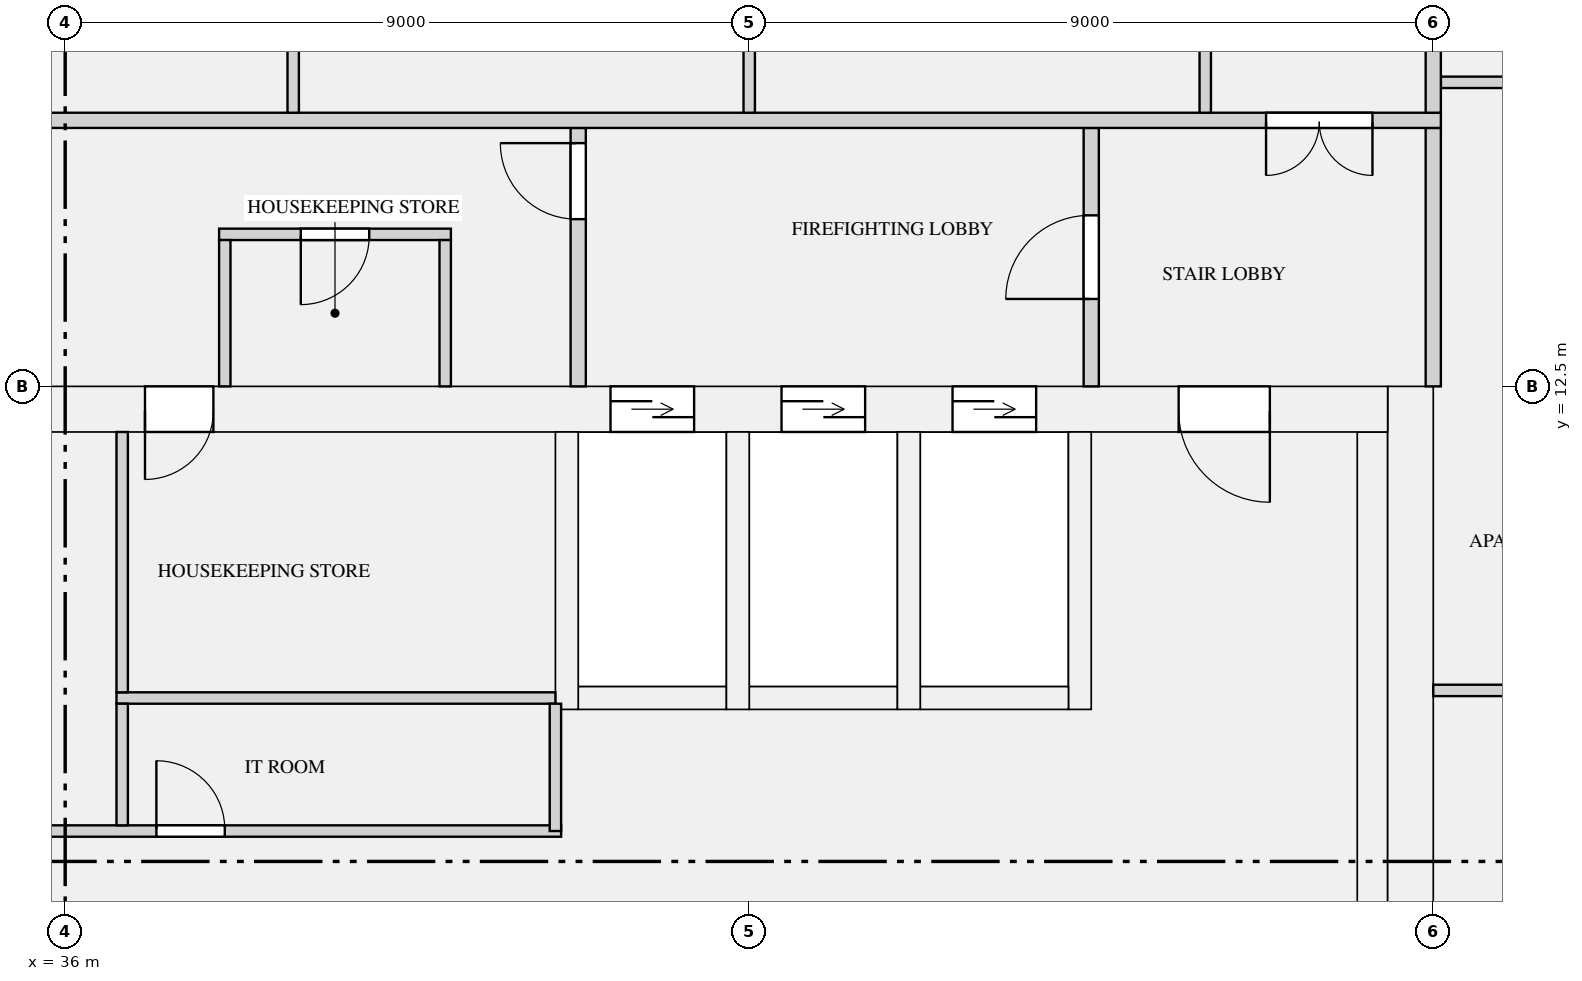
"""IFC4 building model, lengths in metres.
Left out: names, types, materials, properties, quantities, classifications, styles, units other than length and angle.
Written with IfcOpenShell. Run it as: python <this file> out.ifc"""

import sys

from ifc_helpers import new_model, si_unit, direction, frame, frame_2d, origin, place, context, subcontext, project, spatial, rectangle, extrude, element, fill, save


model = new_model("IFC4")
c1 = context("Model", 3, precision=1e-05, world=origin(), true_north=direction((0.0, 1.0)))
c2 = subcontext(c1, "Body", "Model", "MODEL_VIEW")
j1 = project(units=[si_unit("LENGTHUNIT", "METRE"), si_unit("PLANEANGLEUNIT", "RADIAN")], contexts=[c1])
p1 = place(None, origin())
s1 = spatial("IfcSite", under=j1, at=p1, CompositionType="ELEMENT")
p2 = place(p1, origin())
s2 = spatial("IfcBuilding", under=s1, at=p2, CompositionType="ELEMENT")
p3 = place(p2, frame((0.0, 0.0, 198.0)))
s3 = spatial("IfcBuildingStorey", under=s2, at=p3, CompositionType="ELEMENT", Elevation=198.0)
p4 = place(p3, frame((53.7, 0.0, 0.0), z_axis=(0.0, 0.0, 1.0), x_axis=(0.0, 1.0, 0.0)))
e1 = element("IfcWall", 1, at=p4, inside=s3, PredefinedType="SHEAR", context=c2, shape_type="SweptSolid", body=[
    extrude(rectangle(XDim=12.5, YDim=0.6, at=frame_2d((6.25, 0.0))), origin(), (0.0, 0.0, 1.0), 3.15),
])
p5 = place(p3, frame((18.6, 12.2, 0.0), z_axis=(0.0, 0.0, 1.0), x_axis=(1.0, 0.0, 0.0)))
e2 = element("IfcWall", 2, at=p5, inside=s3, PredefinedType="SHEAR", context=c2, shape_type="SweptSolid", body=[
    extrude(rectangle(XDim=34.8, YDim=0.6, at=frame_2d((17.4, 0.0))), origin(), (0.0, 0.0, 1.0), 3.15),
])
p6 = place(p5, frame((24.575, 0.0, 0.0)))
e3 = element("IfcOpeningElement", 3, at=p6, cuts=e2, PredefinedType="OPENING", context=c2, shape_type="SweptSolid", body=[
    extrude(rectangle(XDim=1.1, YDim=2.1, at=frame_2d((0.55, 1.05))), frame((0.0, 0.31, 0.0), z_axis=(0.0, -1.0, 0.0), x_axis=(1.0, 0.0, 0.0)), (0.0, 0.0, 1.0), 0.62),
])
p7 = place(p5, frame((26.825, 0.0, 0.0)))
e4 = element("IfcOpeningElement", 4, at=p7, cuts=e2, PredefinedType="OPENING", context=c2, shape_type="SweptSolid", body=[
    extrude(rectangle(XDim=1.1, YDim=2.1, at=frame_2d((0.55, 1.05))), frame((0.0, 0.31, 0.0), z_axis=(0.0, -1.0, 0.0), x_axis=(1.0, 0.0, 0.0)), (0.0, 0.0, 1.0), 0.62),
])
p8 = place(p5, frame((29.075, 0.0, 0.0)))
e5 = element("IfcOpeningElement", 5, at=p8, cuts=e2, PredefinedType="OPENING", context=c2, shape_type="SweptSolid", body=[
    extrude(rectangle(XDim=1.1, YDim=2.1, at=frame_2d((0.55, 1.05))), frame((0.0, 0.31, 0.0), z_axis=(0.0, -1.0, 0.0), x_axis=(1.0, 0.0, 0.0)), (0.0, 0.0, 1.0), 0.62),
])
p9 = place(p5, frame((4.95, 0.0, 0.0)))
e6 = element("IfcOpeningElement", 6, at=p9, cuts=e2, PredefinedType="OPENING", context=c2, shape_type="SweptSolid", body=[
    extrude(rectangle(XDim=0.9, YDim=2.1, at=frame_2d((0.45, 1.05))), frame((0.0, 0.31, 0.0), z_axis=(0.0, -1.0, 0.0), x_axis=(1.0, 0.0, 0.0)), (0.0, 0.0, 1.0), 0.62),
])
p10 = place(p5, frame((18.45, 0.0, 0.0)))
e7 = element("IfcOpeningElement", 7, at=p10, cuts=e2, PredefinedType="OPENING", context=c2, shape_type="SweptSolid", body=[
    extrude(rectangle(XDim=0.9, YDim=2.1, at=frame_2d((0.45, 1.05))), frame((0.0, 0.31, 0.0), z_axis=(0.0, -1.0, 0.0), x_axis=(1.0, 0.0, 0.0)), (0.0, 0.0, 1.0), 0.62),
])
p11 = place(p5, frame((1.55, 0.0, 0.0)))
e8 = element("IfcOpeningElement", 8, at=p11, cuts=e2, PredefinedType="OPENING", context=c2, shape_type="SweptSolid", body=[
    extrude(rectangle(XDim=1.2, YDim=2.1, at=frame_2d((0.6, 1.05))), frame((0.0, 0.31, 0.0), z_axis=(0.0, -1.0, 0.0), x_axis=(1.0, 0.0, 0.0)), (0.0, 0.0, 1.0), 0.62),
])
p12 = place(p5, frame((32.05, 0.0, 0.0)))
e9 = element("IfcOpeningElement", 9, at=p12, cuts=e2, PredefinedType="OPENING", context=c2, shape_type="SweptSolid", body=[
    extrude(rectangle(XDim=1.2, YDim=2.1, at=frame_2d((0.6, 1.05))), frame((0.0, 0.31, 0.0), z_axis=(0.0, -1.0, 0.0), x_axis=(1.0, 0.0, 0.0)), (0.0, 0.0, 1.0), 0.62),
])
p13 = place(p3, frame((53.2, 1.0, 0.0), z_axis=(0.0, 0.0, 1.0), x_axis=(0.0, 1.0, 0.0)))
e10 = element("IfcWall", 10, at=p13, inside=s3, PredefinedType="SHEAR", context=c2, shape_type="SweptSolid", body=[
    extrude(rectangle(XDim=10.9, YDim=0.4, at=frame_2d((5.45, 0.0))), origin(), (0.0, 0.0, 1.0), 3.15),
])
p14 = place(p3, frame((42.75, 8.4, 0.0), z_axis=(0.0, 0.0, 1.0), x_axis=(1.0, 0.0, 0.0)))
e11 = element("IfcWall", 11, at=p14, inside=s3, PredefinedType="SHEAR", context=c2, shape_type="SweptSolid", body=[
    extrude(rectangle(XDim=1.95, YDim=0.3, at=frame_2d((0.975, 0.0))), origin(), (0.0, 0.0, 1.0), 3.15),
])
p15 = place(p3, frame((42.6, 8.25, 0.0), z_axis=(0.0, 0.0, 1.0), x_axis=(0.0, 1.0, 0.0)))
e12 = element("IfcWall", 12, at=p15, inside=s3, PredefinedType="SHEAR", context=c2, shape_type="SweptSolid", body=[
    extrude(rectangle(XDim=3.65, YDim=0.3, at=frame_2d((1.825, 0.0))), origin(), (0.0, 0.0, 1.0), 3.15),
])
p16 = place(p3, frame((45.0, 8.4, 0.0), z_axis=(0.0, 0.0, 1.0), x_axis=(1.0, 0.0, 0.0)))
e13 = element("IfcWall", 13, at=p16, inside=s3, PredefinedType="SHEAR", context=c2, shape_type="SweptSolid", body=[
    extrude(rectangle(XDim=1.95, YDim=0.3, at=frame_2d((0.975, 0.0))), origin(), (0.0, 0.0, 1.0), 3.15),
])
p17 = place(p3, frame((44.85, 8.25, 0.0), z_axis=(0.0, 0.0, 1.0), x_axis=(0.0, 1.0, 0.0)))
e14 = element("IfcWall", 14, at=p17, inside=s3, PredefinedType="SHEAR", context=c2, shape_type="SweptSolid", body=[
    extrude(rectangle(XDim=3.65, YDim=0.3, at=frame_2d((1.825, 0.0))), origin(), (0.0, 0.0, 1.0), 3.15),
])
p18 = place(p3, frame((47.25, 8.4, 0.0), z_axis=(0.0, 0.0, 1.0), x_axis=(1.0, 0.0, 0.0)))
e15 = element("IfcWall", 15, at=p18, inside=s3, PredefinedType="SHEAR", context=c2, shape_type="SweptSolid", body=[
    extrude(rectangle(XDim=1.95, YDim=0.3, at=frame_2d((0.975, 0.0))), origin(), (0.0, 0.0, 1.0), 3.15),
])
for number, where, z_axis, x_axis in (
    (16, (47.1, 8.25, 0.0), (0.0, 0.0, 1.0), (0.0, 1.0, 0.0)),
    (17, (49.35, 8.25, 0.0), (0.0, 0.0, 1.0), (0.0, 1.0, 0.0)),
):
    element("IfcWall", number, at=place(p3, frame(where, z_axis=z_axis, x_axis=x_axis)), inside=s3, PredefinedType="SHEAR", context=c2, shape_type="SweptSolid", body=[
        extrude(rectangle(XDim=3.65, YDim=0.3, at=frame_2d((1.825, 0.0))), origin(), (0.0, 0.0, 1.0), 3.15),
    ])
p19 = place(p3, frame((22.725, 6.65, 0.0), z_axis=(0.0, 0.0, 1.0), x_axis=(1.0, 0.0, 0.0)))
e18 = element("IfcWall", 18, at=p19, inside=s3, PredefinedType="PARTITIONING", context=c2, shape_type="SweptSolid", body=[
    extrude(rectangle(XDim=19.8, YDim=0.15, at=frame_2d((9.9, 0.0))), origin(), (0.0, 0.0, 1.0), 2.83),
])
p20 = place(p19, frame((0.825, 0.0, 0.0)))
e19 = element("IfcOpeningElement", 19, at=p20, cuts=e18, PredefinedType="OPENING", context=c2, shape_type="SweptSolid", body=[
    extrude(rectangle(XDim=0.9, YDim=2.1, at=frame_2d((0.45, 1.05))), frame((0.0, 0.085, 0.0), z_axis=(0.0, -1.0, 0.0), x_axis=(1.0, 0.0, 0.0)), (0.0, 0.0, 1.0), 0.17),
])
p21 = place(p19, frame((4.825, 0.0, 0.0)))
e20 = element("IfcOpeningElement", 20, at=p21, cuts=e18, PredefinedType="OPENING", context=c2, shape_type="SweptSolid", body=[
    extrude(rectangle(XDim=0.9, YDim=2.1, at=frame_2d((0.45, 1.05))), frame((0.0, 0.085, 0.0), z_axis=(0.0, -1.0, 0.0), x_axis=(1.0, 0.0, 0.0)), (0.0, 0.0, 1.0), 0.17),
])
p22 = place(p19, frame((9.825, 0.0, 0.0)))
e21 = element("IfcOpeningElement", 21, at=p22, cuts=e18, PredefinedType="OPENING", context=c2, shape_type="SweptSolid", body=[
    extrude(rectangle(XDim=0.9, YDim=2.1, at=frame_2d((0.45, 1.05))), frame((0.0, 0.085, 0.0), z_axis=(0.0, -1.0, 0.0), x_axis=(1.0, 0.0, 0.0)), (0.0, 0.0, 1.0), 0.17),
])
p23 = place(p19, frame((14.475, 0.0, 0.0)))
e22 = element("IfcOpeningElement", 22, at=p23, cuts=e18, PredefinedType="OPENING", context=c2, shape_type="SweptSolid", body=[
    extrude(rectangle(XDim=0.9, YDim=2.1, at=frame_2d((0.45, 1.05))), frame((0.0, 0.085, 0.0), z_axis=(0.0, -1.0, 0.0), x_axis=(1.0, 0.0, 0.0)), (0.0, 0.0, 1.0), 0.17),
])
p24 = place(p3, frame((36.675, 8.4, 0.0), z_axis=(0.0, 0.0, 1.0), x_axis=(1.0, 0.0, 0.0)))
e23 = element("IfcWall", 23, at=p24, inside=s3, PredefinedType="PARTITIONING", context=c2, shape_type="SweptSolid", body=[
    extrude(rectangle(XDim=5.775, YDim=0.15, at=frame_2d((2.887, 0.0))), origin(), (0.0, 0.0, 1.0), 2.83),
])
p25 = place(p3, frame((38.025, 14.5, 0.0), z_axis=(0.0, 0.0, 1.0), x_axis=(1.0, 0.0, 0.0)))
e24 = element("IfcWall", 24, at=p25, inside=s3, PredefinedType="PARTITIONING", context=c2, shape_type="SweptSolid", body=[
    extrude(rectangle(XDim=3.05, YDim=0.15, at=frame_2d((1.525, 0.0))), origin(), (0.0, 0.0, 1.0), 2.83),
])
p26 = place(p25, frame((1.075, 0.0, 0.0)))
e25 = element("IfcOpeningElement", 25, at=p26, cuts=e24, PredefinedType="OPENING", context=c2, shape_type="SweptSolid", body=[
    extrude(rectangle(XDim=0.9, YDim=2.1, at=frame_2d((0.45, 1.05))), frame((0.0, 0.085, 0.0), z_axis=(0.0, -1.0, 0.0), x_axis=(1.0, 0.0, 0.0)), (0.0, 0.0, 1.0), 0.17),
])
p27 = place(p3, frame((42.45, 6.65, 0.0), z_axis=(0.0, 0.0, 1.0), x_axis=(0.0, 1.0, 0.0)))
e26 = element("IfcWall", 26, at=p27, inside=s3, PredefinedType="PARTITIONING", context=c2, shape_type="SweptSolid", body=[
    extrude(rectangle(XDim=1.675, YDim=0.15, at=frame_2d((0.837, 0.0))), origin(), (0.0, 0.0, 1.0), 2.83),
])
p28 = place(p3, frame((36.75, 6.725, 0.0), z_axis=(0.0, 0.0, 1.0), x_axis=(0.0, 1.0, 0.0)))
e27 = element("IfcWall", 27, at=p28, inside=s3, PredefinedType="PARTITIONING", context=c2, shape_type="SweptSolid", body=[
    extrude(rectangle(XDim=1.6, YDim=0.15, at=frame_2d((0.8, 0.0))), origin(), (0.0, 0.0, 1.0), 2.83),
])
p29 = place(p3, frame((36.75, 8.475, 0.0), z_axis=(0.0, 0.0, 1.0), x_axis=(0.0, 1.0, 0.0)))
e28 = element("IfcWall", 28, at=p29, inside=s3, PredefinedType="PARTITIONING", context=c2, shape_type="SweptSolid", body=[
    extrude(rectangle(XDim=3.425, YDim=0.15, at=frame_2d((1.712, 0.0))), origin(), (0.0, 0.0, 1.0), 2.83),
])
for number, where, z_axis, x_axis in (
    (29, (38.1, 12.5, 0.0), (0.0, 0.0, 1.0), (0.0, 1.0, 0.0)),
    (30, (41.0, 12.5, 0.0), (0.0, 0.0, 1.0), (0.0, 1.0, 0.0)),
):
    element("IfcWall", number, at=place(p3, frame(where, z_axis=z_axis, x_axis=x_axis)), inside=s3, PredefinedType="PARTITIONING", context=c2, shape_type="SweptSolid", body=[
        extrude(rectangle(XDim=1.925, YDim=0.15, at=frame_2d((0.962, 0.0))), origin(), (0.0, 0.0, 1.0), 2.83),
    ])
p30 = place(p3, frame((42.75, 12.5, 0.0), z_axis=(0.0, 0.0, 1.0), x_axis=(0.0, 1.0, 0.0)))
e31 = element("IfcWall", 31, at=p30, inside=s3, PredefinedType="PARTITIONING", context=c2, shape_type="SweptSolid", body=[
    extrude(rectangle(XDim=3.4, YDim=0.2, at=frame_2d((1.7, 0.0))), origin(), (0.0, 0.0, 1.0), 2.83),
])
p31 = place(p30, frame((2.2, 0.0, 0.0)))
e32 = element("IfcOpeningElement", 32, at=p31, cuts=e31, PredefinedType="OPENING", context=c2, shape_type="SweptSolid", body=[
    extrude(rectangle(XDim=1.0, YDim=2.1, at=frame_2d((0.5, 1.05))), frame((0.0, 0.11, 0.0), z_axis=(0.0, -1.0, 0.0), x_axis=(1.0, 0.0, 0.0)), (0.0, 0.0, 1.0), 0.22),
])
p32 = place(p3, frame((49.5, 12.5, 0.0), z_axis=(0.0, 0.0, 1.0), x_axis=(0.0, 1.0, 0.0)))
e33 = element("IfcWall", 33, at=p32, inside=s3, PredefinedType="PARTITIONING", context=c2, shape_type="SweptSolid", body=[
    extrude(rectangle(XDim=3.4, YDim=0.2, at=frame_2d((1.7, 0.0))), origin(), (0.0, 0.0, 1.0), 2.83),
])
p33 = place(p32, frame((1.15, 0.0, 0.0)))
e34 = element("IfcOpeningElement", 34, at=p33, cuts=e33, PredefinedType="OPENING", context=c2, shape_type="SweptSolid", body=[
    extrude(rectangle(XDim=1.1, YDim=2.1, at=frame_2d((0.55, 1.05))), frame((0.0, 0.11, 0.0), z_axis=(0.0, -1.0, 0.0), x_axis=(1.0, 0.0, 0.0)), (0.0, 0.0, 1.0), 0.22),
])
p34 = place(p3, frame((54.0, 12.5, 0.0), z_axis=(0.0, 0.0, 1.0), x_axis=(0.0, 1.0, 0.0)))
e35 = element("IfcWall", 35, at=p34, inside=s3, PredefinedType="PARTITIONING", context=c2, shape_type="SweptSolid", body=[
    extrude(rectangle(XDim=3.4, YDim=0.2, at=frame_2d((1.7, 0.0))), origin(), (0.0, 0.0, 1.0), 2.83),
])
p35 = place(p3, frame((54.1, 16.5, 0.0), z_axis=(0.0, 0.0, 1.0), x_axis=(1.0, 0.0, 0.0)))
e36 = element("IfcWall", 36, at=p35, inside=s3, PredefinedType="PARTITIONING", context=c2, shape_type="SweptSolid", body=[
    extrude(rectangle(XDim=14.75, YDim=0.15, at=frame_2d((7.375, 0.0))), origin(), (0.0, 0.0, 1.0), 2.83),
])
p36 = place(p35, frame((1.4, 0.0, 0.0)))
e37 = element("IfcOpeningElement", 37, at=p36, cuts=e36, PredefinedType="OPENING", context=c2, shape_type="SweptSolid", body=[
    extrude(rectangle(XDim=1.5, YDim=2.1, at=frame_2d((0.75, 1.05))), frame((0.0, 0.085, 0.0), z_axis=(0.0, -1.0, 0.0), x_axis=(1.0, 0.0, 0.0)), (0.0, 0.0, 1.0), 0.17),
])
p37 = place(p35, frame((11.15, 0.0, 0.0)))
e38 = element("IfcOpeningElement", 38, at=p37, cuts=e36, PredefinedType="OPENING", context=c2, shape_type="SweptSolid", body=[
    extrude(rectangle(XDim=1.5, YDim=2.1, at=frame_2d((0.75, 1.05))), frame((0.0, 0.085, 0.0), z_axis=(0.0, -1.0, 0.0), x_axis=(1.0, 0.0, 0.0)), (0.0, 0.0, 1.0), 0.17),
])
p38 = place(p3, frame((54.0, 8.5, 0.0), z_axis=(0.0, 0.0, 1.0), x_axis=(1.0, 0.0, 0.0)))
e39 = element("IfcWall", 39, at=p38, inside=s3, PredefinedType="PARTITIONING", context=c2, shape_type="SweptSolid", body=[
    extrude(rectangle(XDim=8.925, YDim=0.15, at=frame_2d((4.462, 0.0))), origin(), (0.0, 0.0, 1.0), 2.83),
])
p39 = place(p38, frame((1.8, 0.0, 0.0)))
e40 = element("IfcOpeningElement", 40, at=p39, cuts=e39, PredefinedType="OPENING", context=c2, shape_type="SweptSolid", body=[
    extrude(rectangle(XDim=0.9, YDim=2.1, at=frame_2d((0.45, 1.05))), frame((0.0, 0.085, 0.0), z_axis=(0.0, -1.0, 0.0), x_axis=(1.0, 0.0, 0.0)), (0.0, 0.0, 1.0), 0.17),
])
p40 = place(p38, frame((6.3, 0.0, 0.0)))
e41 = element("IfcOpeningElement", 41, at=p40, cuts=e39, PredefinedType="OPENING", context=c2, shape_type="SweptSolid", body=[
    extrude(rectangle(XDim=0.9, YDim=2.1, at=frame_2d((0.45, 1.05))), frame((0.0, 0.085, 0.0), z_axis=(0.0, -1.0, 0.0), x_axis=(1.0, 0.0, 0.0)), (0.0, 0.0, 1.0), 0.17),
])
p41 = place(p3, frame((17.9, 16.0, 0.0), z_axis=(0.0, 0.0, 1.0), x_axis=(1.0, 0.0, 0.0)))
e42 = element("IfcWall", 42, at=p41, inside=s3, PredefinedType="PARTITIONING", context=c2, shape_type="SweptSolid", body=[
    extrude(rectangle(XDim=36.2, YDim=0.2, at=frame_2d((18.1, 0.0))), origin(), (0.0, 0.0, 1.0), 2.83),
])
p42 = place(p41, frame((0.9, 0.0, 0.0)))
e43 = element("IfcOpeningElement", 43, at=p42, cuts=e42, PredefinedType="OPENING", context=c2, shape_type="SweptSolid", body=[
    extrude(rectangle(XDim=1.4, YDim=2.1, at=frame_2d((0.7, 1.05))), frame((0.0, 0.11, 0.0), z_axis=(0.0, -1.0, 0.0), x_axis=(1.0, 0.0, 0.0)), (0.0, 0.0, 1.0), 0.22),
])
p43 = place(p41, frame((33.9, 0.0, 0.0)))
e44 = element("IfcOpeningElement", 44, at=p43, cuts=e42, PredefinedType="OPENING", context=c2, shape_type="SweptSolid", body=[
    extrude(rectangle(XDim=1.4, YDim=2.1, at=frame_2d((0.7, 1.05))), frame((0.0, 0.11, 0.0), z_axis=(0.0, -1.0, 0.0), x_axis=(1.0, 0.0, 0.0)), (0.0, 0.0, 1.0), 0.22),
])
p44 = place(p3, frame((54.0, 16.1, 0.0), z_axis=(0.0, 0.0, 1.0), x_axis=(0.0, 1.0, 0.0)))
e45 = element("IfcWall", 45, at=p44, inside=s3, PredefinedType="PARTITIONING", context=c2, shape_type="SweptSolid", body=[
    extrude(rectangle(XDim=7.8, YDim=0.2, at=frame_2d((3.9, 0.0))), origin(), (0.0, 0.0, 1.0), 2.83),
])
p45 = place(p44, frame((1.85, 0.0, 0.0)))
e46 = element("IfcOpeningElement", 46, at=p45, cuts=e45, PredefinedType="OPENING", context=c2, shape_type="SweptSolid", body=[
    extrude(rectangle(XDim=1.1, YDim=2.1, at=frame_2d((0.55, 1.05))), frame((0.0, 0.11, 0.0), z_axis=(0.0, -1.0, 0.0), x_axis=(1.0, 0.0, 0.0)), (0.0, 0.0, 1.0), 0.22),
])
for number, where, z_axis, x_axis in (
    (47, (51.0, 16.1, 0.0), (0.0, 0.0, 1.0), (0.0, 1.0, 0.0)),
    (48, (45.0, 16.1, 0.0), (0.0, 0.0, 1.0), (0.0, 1.0, 0.0)),
    (49, (39.0, 16.1, 0.0), (0.0, 0.0, 1.0), (0.0, 1.0, 0.0)),
):
    element("IfcWall", number, at=place(p3, frame(where, z_axis=z_axis, x_axis=x_axis)), inside=s3, PredefinedType="PARTITIONING", context=c2, shape_type="SweptSolid", body=[
        extrude(rectangle(XDim=4.825, YDim=0.15, at=frame_2d((2.413, 0.0))), origin(), (0.0, 0.0, 1.0), 2.83),
    ])
p46 = place(p6, origin())
e50 = element("IfcDoor", 50, at=p46, inside=s3, OperationType="DOUBLE_DOOR_SLIDING", PredefinedType="DOOR", context=c2, shape_type="SweptSolid", body=[
    extrude(rectangle(XDim=1.1, YDim=2.1, at=frame_2d((0.55, 1.05))), frame((0.0, 0.025, 0.0), z_axis=(0.0, -1.0, 0.0), x_axis=(1.0, 0.0, 0.0)), (0.0, 0.0, 1.0), 0.05),
])
fill(e3, e50)
p47 = place(p7, origin())
e51 = element("IfcDoor", 51, at=p47, inside=s3, OperationType="DOUBLE_DOOR_SLIDING", PredefinedType="DOOR", context=c2, shape_type="SweptSolid", body=[
    extrude(rectangle(XDim=1.1, YDim=2.1, at=frame_2d((0.55, 1.05))), frame((0.0, 0.025, 0.0), z_axis=(0.0, -1.0, 0.0), x_axis=(1.0, 0.0, 0.0)), (0.0, 0.0, 1.0), 0.05),
])
fill(e4, e51)
p48 = place(p8, origin())
e52 = element("IfcDoor", 52, at=p48, inside=s3, OperationType="DOUBLE_DOOR_SLIDING", PredefinedType="DOOR", context=c2, shape_type="SweptSolid", body=[
    extrude(rectangle(XDim=1.1, YDim=2.1, at=frame_2d((0.55, 1.05))), frame((0.0, 0.025, 0.0), z_axis=(0.0, -1.0, 0.0), x_axis=(1.0, 0.0, 0.0)), (0.0, 0.0, 1.0), 0.05),
])
fill(e5, e52)
p49 = place(p26, frame((0.9, 0.0, 0.0), z_axis=(0.0, 0.0, 1.0), x_axis=(-1.0, 0.0, 0.0)))
e53 = element("IfcDoor", 53, at=p49, inside=s3, OperationType="SINGLE_SWING_RIGHT", PredefinedType="DOOR", context=c2, shape_type="SweptSolid", body=[
    extrude(rectangle(XDim=0.9, YDim=2.1, at=frame_2d((0.45, 1.05))), frame((0.0, 0.025, 0.0), z_axis=(0.0, -1.0, 0.0), x_axis=(1.0, 0.0, 0.0)), (0.0, 0.0, 1.0), 0.05),
])
fill(e25, e53)
p50 = place(p23, origin())
e54 = element("IfcDoor", 54, at=p50, inside=s3, OperationType="SINGLE_SWING_LEFT", PredefinedType="DOOR", context=c2, shape_type="SweptSolid", body=[
    extrude(rectangle(XDim=0.9, YDim=2.1, at=frame_2d((0.45, 1.05))), frame((0.0, 0.025, 0.0), z_axis=(0.0, -1.0, 0.0), x_axis=(1.0, 0.0, 0.0)), (0.0, 0.0, 1.0), 0.05),
])
fill(e22, e54)
p51 = place(p10, frame((0.9, 0.0, 0.0), z_axis=(0.0, 0.0, 1.0), x_axis=(-1.0, 0.0, 0.0)))
e55 = element("IfcDoor", 55, at=p51, inside=s3, OperationType="SINGLE_SWING_RIGHT", PredefinedType="DOOR", context=c2, shape_type="SweptSolid", body=[
    extrude(rectangle(XDim=0.9, YDim=2.1, at=frame_2d((0.45, 1.05))), frame((0.0, 0.025, 0.0), z_axis=(0.0, -1.0, 0.0), x_axis=(1.0, 0.0, 0.0)), (0.0, 0.0, 1.0), 0.05),
])
fill(e7, e55)
p52 = place(p12, frame((1.2, 0.0, 0.0), z_axis=(0.0, 0.0, 1.0), x_axis=(-1.0, 0.0, 0.0)))
e56 = element("IfcDoor", 56, at=p52, inside=s3, OperationType="SINGLE_SWING_LEFT", PredefinedType="DOOR", context=c2, shape_type="SweptSolid", body=[
    extrude(rectangle(XDim=1.2, YDim=2.1, at=frame_2d((0.6, 1.05))), frame((0.0, 0.025, 0.0), z_axis=(0.0, -1.0, 0.0), x_axis=(1.0, 0.0, 0.0)), (0.0, 0.0, 1.0), 0.05),
])
fill(e9, e56)
p53 = place(p31, origin())
e57 = element("IfcDoor", 57, at=p53, inside=s3, OperationType="SINGLE_SWING_RIGHT", PredefinedType="DOOR", context=c2, shape_type="SweptSolid", body=[
    extrude(rectangle(XDim=1.0, YDim=2.1, at=frame_2d((0.5, 1.05))), frame((0.0, 0.025, 0.0), z_axis=(0.0, -1.0, 0.0), x_axis=(1.0, 0.0, 0.0)), (0.0, 0.0, 1.0), 0.05),
])
fill(e32, e57)
p54 = place(p33, origin())
e58 = element("IfcDoor", 58, at=p54, inside=s3, OperationType="SINGLE_SWING_LEFT", PredefinedType="DOOR", context=c2, shape_type="SweptSolid", body=[
    extrude(rectangle(XDim=1.1, YDim=2.1, at=frame_2d((0.55, 1.05))), frame((0.0, 0.025, 0.0), z_axis=(0.0, -1.0, 0.0), x_axis=(1.0, 0.0, 0.0)), (0.0, 0.0, 1.0), 0.05),
])
fill(e34, e58)
p55 = place(p43, frame((1.4, 0.0, 0.0), z_axis=(0.0, 0.0, 1.0), x_axis=(-1.0, 0.0, 0.0)))
e59 = element("IfcDoor", 59, at=p55, inside=s3, OperationType="DOUBLE_DOOR_SINGLE_SWING", PredefinedType="DOOR", context=c2, shape_type="SweptSolid", body=[
    extrude(rectangle(XDim=1.4, YDim=2.1, at=frame_2d((0.7, 1.05))), frame((0.0, 0.025, 0.0), z_axis=(0.0, -1.0, 0.0), x_axis=(1.0, 0.0, 0.0)), (0.0, 0.0, 1.0), 0.05),
])
fill(e44, e59)
save(model, sys.argv[1])
